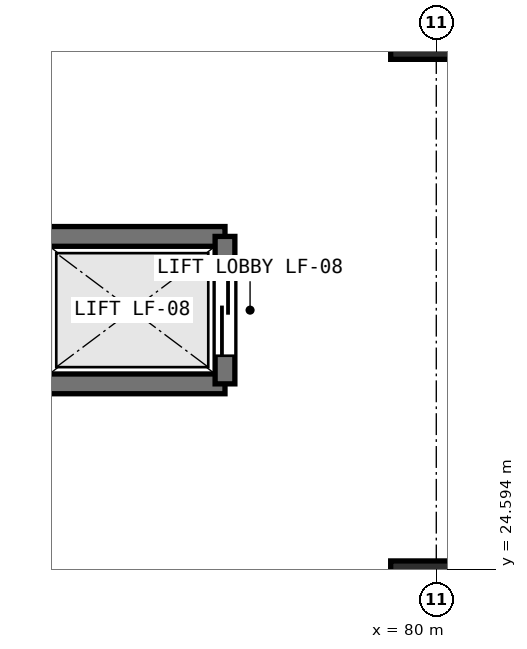
"""IFC4 building model, lengths in metres.
Left out: names, types, materials, properties, quantities, classifications, styles, units other than length and angle.
Written with IfcOpenShell. Run it as: python <this file> out.ifc"""

import sys

from ifc_helpers import new_model, si_unit, direction, frame, frame_2d, origin, origin_2d, place, context, subcontext, project, spatial, rectangle, extrude, element, fill, save


model = new_model("IFC4")
c1 = context("Model", 3, precision=1e-05, world=origin(), true_north=direction((0.0, 1.0)))
c2 = subcontext(c1, "Body", "Model", "MODEL_VIEW")
j1 = project(units=[si_unit("LENGTHUNIT", "METRE"), si_unit("PLANEANGLEUNIT", "RADIAN")], contexts=[c1])
p1 = place(None, origin())
s1 = spatial("IfcSite", under=j1, at=p1, CompositionType="ELEMENT")
p2 = place(p1, origin())
s2 = spatial("IfcBuilding", under=s1, at=p2, CompositionType="ELEMENT")
p3 = place(p2, frame((0.0, 0.0, 5.4)))
s3 = spatial("IfcBuildingStorey", under=s2, at=p3, CompositionType="ELEMENT", Elevation=5.4)
for number, where, z_axis, x_axis in (
    (1, (80.0, 24.0, 0.0), (0.0, 0.0, 1.0), (1.0, 0.0, 0.0)),
    (2, (80.0, 32.0, 0.0), (0.0, 0.0, 1.0), (1.0, 0.0, 0.0)),
):
    element("IfcColumn", number, at=place(p3, frame(where, z_axis=z_axis, x_axis=x_axis)), inside=s3, PredefinedType="COLUMN", context=c2, shape_type="SweptSolid", body=[
        extrude(rectangle(XDim=1.2, YDim=1.4, at=origin_2d()), origin(), (0.0, 0.0, 1.0), 4.8),
    ])
for number, where, z_axis, x_axis in (
    (3, (74.78, 28.97, 0.0), (0.0, 0.0, 1.0), (1.0, 0.0, 0.0)),
    (4, (77.22, 27.03, 0.0), (0.0, 0.0, 1.0), (-1.0, 0.0, 0.0)),
):
    element("IfcWall", number, at=place(p3, frame(where, z_axis=z_axis, x_axis=x_axis)), inside=s3, PredefinedType="SHEAR", context=c2, shape_type="SweptSolid", body=[
        extrude(rectangle(XDim=2.44, YDim=0.26, at=frame_2d((1.22, 0.0))), origin(), (0.0, 0.0, 1.0), 4.48),
    ])
p4 = place(p3, frame((77.22, 28.97, 0.0), z_axis=(0.0, 0.0, 1.0), x_axis=(0.0, -1.0, 0.0)))
e5 = element("IfcWall", 5, at=p4, inside=s3, PredefinedType="SHEAR", context=c2, shape_type="SweptSolid", body=[
    extrude(rectangle(XDim=1.94, YDim=0.26, at=frame_2d((0.97, 0.0))), origin(), (0.0, 0.0, 1.0), 4.48),
])
p5 = place(p4, frame((0.37, 0.0, 0.0)))
e6 = element("IfcOpeningElement", 6, at=p5, cuts=e5, PredefinedType="OPENING", context=c2, shape_type="SweptSolid", body=[
    extrude(rectangle(XDim=1.2, YDim=2.15, at=frame_2d((0.6, 1.075))), frame((0.0, 0.14, 0.0), z_axis=(0.0, -1.0, 0.0), x_axis=(1.0, 0.0, 0.0)), (0.0, 0.0, 1.0), 0.28),
])
p6 = place(p5, origin())
e7 = element("IfcDoor", 7, at=p6, inside=s3, OperationType="SLIDING_TO_LEFT", PredefinedType="DOOR", context=c2, shape_type="SweptSolid", body=[
    extrude(rectangle(XDim=1.2, YDim=2.15, at=frame_2d((0.6, 1.075))), frame((0.0, 0.025, 0.0), z_axis=(0.0, -1.0, 0.0), x_axis=(1.0, 0.0, 0.0)), (0.0, 0.0, 1.0), 0.05),
])
fill(e6, e7)
save(model, sys.argv[1])
